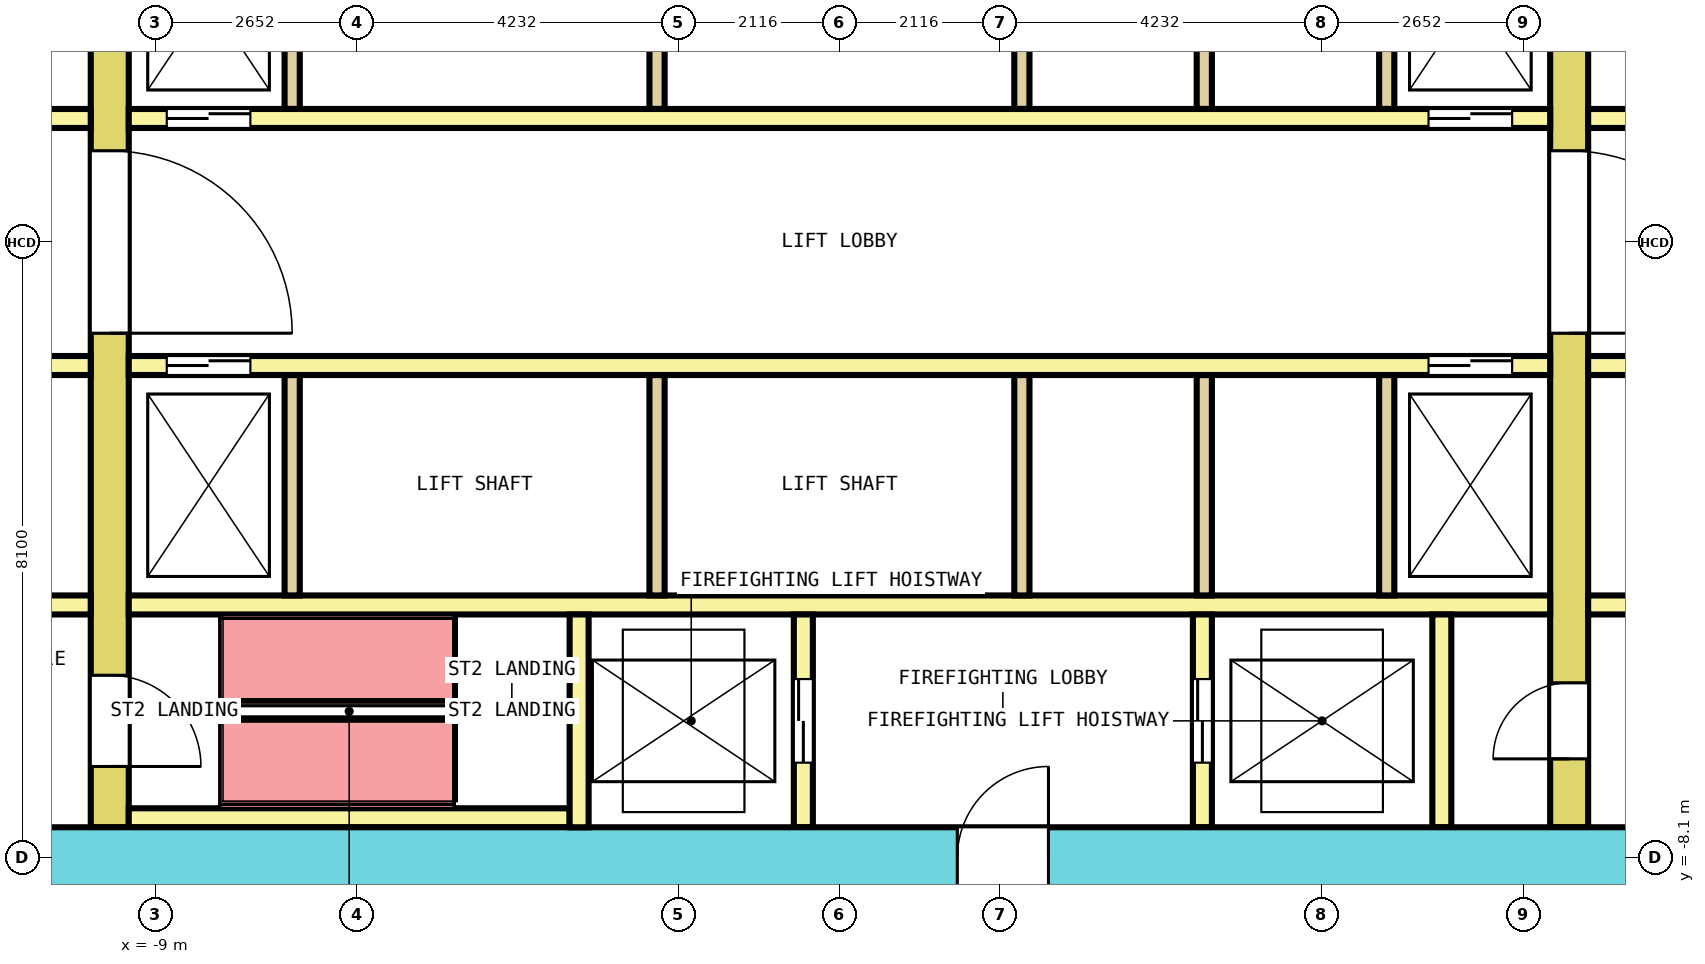
"""IFC4 building model, lengths in metres.
Left out: names, types, materials, properties, quantities, classifications, styles, units other than length and angle.
Written with IfcOpenShell. Run it as: python <this file> out.ifc"""

import sys

from ifc_helpers import new_model, si_unit, direction, frame, frame_2d, origin, place, context, subcontext, project, spatial, rectangle, extrude, element, fill, save


model = new_model("IFC4")
c1 = context("Model", 3, precision=1e-05, world=origin(), true_north=direction((0.0, 1.0)))
c2 = subcontext(c1, "Body", "Model", "MODEL_VIEW")
j1 = project(units=[si_unit("LENGTHUNIT", "METRE"), si_unit("PLANEANGLEUNIT", "RADIAN")], contexts=[c1])
p1 = place(None, origin())
s1 = spatial("IfcSite", under=j1, at=p1, CompositionType="ELEMENT")
p2 = place(p1, origin())
s2 = spatial("IfcBuilding", under=s1, at=p2, CompositionType="ELEMENT")
p3 = place(p2, frame((0.0, 0.0, 71.8)))
s3 = spatial("IfcBuildingStorey", under=s2, at=p3, CompositionType="ELEMENT", Elevation=71.8)
p4 = place(p3, frame((-12.8, -8.1, 0.0), z_axis=(0.0, 0.0, 1.0), x_axis=(1.0, 0.0, 0.0)))
e1 = element("IfcWall", 1, at=p4, inside=s3, PredefinedType="SHEAR", context=c2, shape_type="SweptSolid", body=[
    extrude(rectangle(XDim=25.6, YDim=0.8, at=frame_2d((12.8, 0.0))), origin(), (0.0, 0.0, 1.0), 8.7),
])
p5 = place(p4, frame((14.35, 0.0, 0.0)))
e2 = element("IfcOpeningElement", 2, at=p5, cuts=e1, PredefinedType="OPENING", context=c2, shape_type="SweptSolid", body=[
    extrude(rectangle(XDim=1.2, YDim=2.1, at=frame_2d((0.6, 1.05))), frame((0.0, 0.41, 0.0), z_axis=(0.0, -1.0, 0.0), x_axis=(1.0, 0.0, 0.0)), (0.0, 0.0, 1.0), 0.82),
])
p6 = place(p3, frame((-9.6, -7.7, 0.0), z_axis=(0.0, 0.0, 1.0), x_axis=(0.0, 1.0, 0.0)))
e3 = element("IfcWall", 3, at=p6, inside=s3, PredefinedType="SHEAR", context=c2, shape_type="SweptSolid", body=[
    extrude(rectangle(XDim=15.4, YDim=0.5, at=frame_2d((7.7, 0.0))), origin(), (0.0, 0.0, 1.0), 8.7),
])
p7 = place(p6, frame((6.5, 0.0, 0.0)))
e4 = element("IfcOpeningElement", 4, at=p7, cuts=e3, PredefinedType="OPENING", context=c2, shape_type="SweptSolid", body=[
    extrude(rectangle(XDim=2.4, YDim=2.1, at=frame_2d((1.2, 1.05))), frame((0.0, 0.26, 0.0), z_axis=(0.0, -1.0, 0.0), x_axis=(1.0, 0.0, 0.0)), (0.0, 0.0, 1.0), 0.52),
])
p8 = place(p6, frame((13.4, 0.0, 0.0)))
e5 = element("IfcOpeningElement", 5, at=p8, cuts=e3, PredefinedType="OPENING", context=c2, shape_type="SweptSolid", body=[
    extrude(rectangle(XDim=1.2, YDim=2.1, at=frame_2d((0.6, 1.05))), frame((0.0, 0.26, 0.0), z_axis=(0.0, -1.0, 0.0), x_axis=(1.0, 0.0, 0.0)), (0.0, 0.0, 1.0), 0.52),
])
p9 = place(p6, frame((0.8, 0.0, 0.0)))
e6 = element("IfcOpeningElement", 6, at=p9, cuts=e3, PredefinedType="OPENING", context=c2, shape_type="SweptSolid", body=[
    extrude(rectangle(XDim=1.2, YDim=2.1, at=frame_2d((0.6, 1.05))), frame((0.0, 0.26, 0.0), z_axis=(0.0, -1.0, 0.0), x_axis=(1.0, 0.0, 0.0)), (0.0, 0.0, 1.0), 0.52),
])
p10 = place(p3, frame((9.6, -7.7, 0.0), z_axis=(0.0, 0.0, 1.0), x_axis=(0.0, 1.0, 0.0)))
e7 = element("IfcWall", 7, at=p10, inside=s3, PredefinedType="SHEAR", context=c2, shape_type="SweptSolid", body=[
    extrude(rectangle(XDim=15.4, YDim=0.5, at=frame_2d((7.7, 0.0))), origin(), (0.0, 0.0, 1.0), 8.7),
])
p11 = place(p10, frame((6.5, 0.0, 0.0)))
e8 = element("IfcOpeningElement", 8, at=p11, cuts=e7, PredefinedType="OPENING", context=c2, shape_type="SweptSolid", body=[
    extrude(rectangle(XDim=2.4, YDim=2.1, at=frame_2d((1.2, 1.05))), frame((0.0, 0.26, 0.0), z_axis=(0.0, -1.0, 0.0), x_axis=(1.0, 0.0, 0.0)), (0.0, 0.0, 1.0), 0.52),
])
p12 = place(p10, frame((13.4, 0.0, 0.0)))
e9 = element("IfcOpeningElement", 9, at=p12, cuts=e7, PredefinedType="OPENING", context=c2, shape_type="SweptSolid", body=[
    extrude(rectangle(XDim=1.2, YDim=2.1, at=frame_2d((0.6, 1.05))), frame((0.0, 0.26, 0.0), z_axis=(0.0, -1.0, 0.0), x_axis=(1.0, 0.0, 0.0)), (0.0, 0.0, 1.0), 0.52),
])
p13 = place(p10, frame((0.9, 0.0, 0.0)))
e10 = element("IfcOpeningElement", 10, at=p13, cuts=e7, PredefinedType="OPENING", context=c2, shape_type="SweptSolid", body=[
    extrude(rectangle(XDim=1.0, YDim=2.1, at=frame_2d((0.5, 1.05))), frame((0.0, 0.26, 0.0), z_axis=(0.0, -1.0, 0.0), x_axis=(1.0, 0.0, 0.0)), (0.0, 0.0, 1.0), 0.52),
])
p14 = place(p3, frame((-12.8, 1.625, 0.0), z_axis=(0.0, 0.0, 1.0), x_axis=(1.0, 0.0, 0.0)))
e11 = element("IfcWall", 11, at=p14, inside=s3, PredefinedType="SOLIDWALL", context=c2, shape_type="SweptSolid", body=[
    extrude(rectangle(XDim=2.95, YDim=0.25, at=frame_2d((1.475, 0.0))), origin(), (0.0, 0.0, 1.0), 8.7),
])
p15 = place(p14, frame((0.925, 0.0, 0.0)))
e12 = element("IfcOpeningElement", 12, at=p15, cuts=e11, PredefinedType="OPENING", context=c2, shape_type="SweptSolid", body=[
    extrude(rectangle(XDim=1.1, YDim=2.1, at=frame_2d((0.55, 1.05))), frame((0.0, 0.135, 0.0), z_axis=(0.0, -1.0, 0.0), x_axis=(1.0, 0.0, 0.0)), (0.0, 0.0, 1.0), 0.27),
])
p16 = place(p3, frame((-9.35, 1.625, 0.0), z_axis=(0.0, 0.0, 1.0), x_axis=(1.0, 0.0, 0.0)))
e13 = element("IfcWall", 13, at=p16, inside=s3, PredefinedType="SOLIDWALL", context=c2, shape_type="SweptSolid", body=[
    extrude(rectangle(XDim=18.7, YDim=0.25, at=frame_2d((9.35, 0.0))), origin(), (0.0, 0.0, 1.0), 8.7),
])
p17 = place(p16, frame((0.5, 0.0, 0.0)))
e14 = element("IfcOpeningElement", 14, at=p17, cuts=e13, PredefinedType="OPENING", context=c2, shape_type="SweptSolid", body=[
    extrude(rectangle(XDim=1.1, YDim=2.1, at=frame_2d((0.55, 1.05))), frame((0.0, 0.135, 0.0), z_axis=(0.0, -1.0, 0.0), x_axis=(1.0, 0.0, 0.0)), (0.0, 0.0, 1.0), 0.27),
])
p18 = place(p16, frame((17.1, 0.0, 0.0)))
e15 = element("IfcOpeningElement", 15, at=p18, cuts=e13, PredefinedType="OPENING", context=c2, shape_type="SweptSolid", body=[
    extrude(rectangle(XDim=1.1, YDim=2.1, at=frame_2d((0.55, 1.05))), frame((0.0, 0.135, 0.0), z_axis=(0.0, -1.0, 0.0), x_axis=(1.0, 0.0, 0.0)), (0.0, 0.0, 1.0), 0.27),
])
p19 = place(p3, frame((9.85, 1.625, 0.0), z_axis=(0.0, 0.0, 1.0), x_axis=(1.0, 0.0, 0.0)))
e16 = element("IfcWall", 16, at=p19, inside=s3, PredefinedType="SOLIDWALL", context=c2, shape_type="SweptSolid", body=[
    extrude(rectangle(XDim=2.95, YDim=0.25, at=frame_2d((1.475, 0.0))), origin(), (0.0, 0.0, 1.0), 8.7),
])
p20 = place(p19, frame((0.925, 0.0, 0.0)))
e17 = element("IfcOpeningElement", 17, at=p20, cuts=e16, PredefinedType="OPENING", context=c2, shape_type="SweptSolid", body=[
    extrude(rectangle(XDim=1.1, YDim=2.1, at=frame_2d((0.55, 1.05))), frame((0.0, 0.135, 0.0), z_axis=(0.0, -1.0, 0.0), x_axis=(1.0, 0.0, 0.0)), (0.0, 0.0, 1.0), 0.27),
])
for number, where, z_axis, x_axis in (
    (18, (-7.2, 1.75, 0.0), (0.0, 0.0, 1.0), (0.0, 1.0, 0.0)),
    (19, (-2.4, 1.75, 0.0), (0.0, 0.0, 1.0), (0.0, 1.0, 0.0)),
    (20, (2.4, 1.75, 0.0), (0.0, 0.0, 1.0), (0.0, 1.0, 0.0)),
    (21, (4.8, 1.75, 0.0), (0.0, 0.0, 1.0), (0.0, 1.0, 0.0)),
    (22, (7.2, 1.75, 0.0), (0.0, 0.0, 1.0), (0.0, 1.0, 0.0)),
):
    element("IfcWall", number, at=place(p3, frame(where, z_axis=z_axis, x_axis=x_axis)), inside=s3, PredefinedType="SOLIDWALL", context=c2, shape_type="SweptSolid", body=[
        extrude(rectangle(XDim=2.9, YDim=0.2, at=frame_2d((1.45, 0.0))), origin(), (0.0, 0.0, 1.0), 8.7),
    ])
p21 = place(p3, frame((-12.8, -1.625, 0.0), z_axis=(0.0, 0.0, 1.0), x_axis=(1.0, 0.0, 0.0)))
e23 = element("IfcWall", 23, at=p21, inside=s3, PredefinedType="SOLIDWALL", context=c2, shape_type="SweptSolid", body=[
    extrude(rectangle(XDim=2.95, YDim=0.25, at=frame_2d((1.475, 0.0))), origin(), (0.0, 0.0, 1.0), 8.7),
])
p22 = place(p21, frame((0.925, 0.0, 0.0)))
e24 = element("IfcOpeningElement", 24, at=p22, cuts=e23, PredefinedType="OPENING", context=c2, shape_type="SweptSolid", body=[
    extrude(rectangle(XDim=1.1, YDim=2.1, at=frame_2d((0.55, 1.05))), frame((0.0, 0.135, 0.0), z_axis=(0.0, -1.0, 0.0), x_axis=(1.0, 0.0, 0.0)), (0.0, 0.0, 1.0), 0.27),
])
p23 = place(p3, frame((-9.35, -1.625, 0.0), z_axis=(0.0, 0.0, 1.0), x_axis=(1.0, 0.0, 0.0)))
e25 = element("IfcWall", 25, at=p23, inside=s3, PredefinedType="SOLIDWALL", context=c2, shape_type="SweptSolid", body=[
    extrude(rectangle(XDim=18.7, YDim=0.25, at=frame_2d((9.35, 0.0))), origin(), (0.0, 0.0, 1.0), 8.7),
])
p24 = place(p23, frame((0.5, 0.0, 0.0)))
e26 = element("IfcOpeningElement", 26, at=p24, cuts=e25, PredefinedType="OPENING", context=c2, shape_type="SweptSolid", body=[
    extrude(rectangle(XDim=1.1, YDim=2.1, at=frame_2d((0.55, 1.05))), frame((0.0, 0.135, 0.0), z_axis=(0.0, -1.0, 0.0), x_axis=(1.0, 0.0, 0.0)), (0.0, 0.0, 1.0), 0.27),
])
p25 = place(p23, frame((17.1, 0.0, 0.0)))
e27 = element("IfcOpeningElement", 27, at=p25, cuts=e25, PredefinedType="OPENING", context=c2, shape_type="SweptSolid", body=[
    extrude(rectangle(XDim=1.1, YDim=2.1, at=frame_2d((0.55, 1.05))), frame((0.0, 0.135, 0.0), z_axis=(0.0, -1.0, 0.0), x_axis=(1.0, 0.0, 0.0)), (0.0, 0.0, 1.0), 0.27),
])
p26 = place(p3, frame((9.85, -1.625, 0.0), z_axis=(0.0, 0.0, 1.0), x_axis=(1.0, 0.0, 0.0)))
e28 = element("IfcWall", 28, at=p26, inside=s3, PredefinedType="SOLIDWALL", context=c2, shape_type="SweptSolid", body=[
    extrude(rectangle(XDim=2.95, YDim=0.25, at=frame_2d((1.475, 0.0))), origin(), (0.0, 0.0, 1.0), 8.7),
])
p27 = place(p26, frame((0.925, 0.0, 0.0)))
e29 = element("IfcOpeningElement", 29, at=p27, cuts=e28, PredefinedType="OPENING", context=c2, shape_type="SweptSolid", body=[
    extrude(rectangle(XDim=1.1, YDim=2.1, at=frame_2d((0.55, 1.05))), frame((0.0, 0.135, 0.0), z_axis=(0.0, -1.0, 0.0), x_axis=(1.0, 0.0, 0.0)), (0.0, 0.0, 1.0), 0.27),
])
p28 = place(p3, frame((-12.8, -4.775, 0.0), z_axis=(0.0, 0.0, 1.0), x_axis=(1.0, 0.0, 0.0)))
e30 = element("IfcWall", 30, at=p28, inside=s3, PredefinedType="SOLIDWALL", context=c2, shape_type="SweptSolid", body=[
    extrude(rectangle(XDim=2.95, YDim=0.25, at=frame_2d((1.475, 0.0))), origin(), (0.0, 0.0, 1.0), 8.7),
])
p29 = place(p3, frame((-9.35, -4.775, 0.0), z_axis=(0.0, 0.0, 1.0), x_axis=(1.0, 0.0, 0.0)))
e31 = element("IfcWall", 31, at=p29, inside=s3, PredefinedType="SOLIDWALL", context=c2, shape_type="SweptSolid", body=[
    extrude(rectangle(XDim=18.7, YDim=0.25, at=frame_2d((9.35, 0.0))), origin(), (0.0, 0.0, 1.0), 8.7),
])
p30 = place(p3, frame((9.85, -4.775, 0.0), z_axis=(0.0, 0.0, 1.0), x_axis=(1.0, 0.0, 0.0)))
e32 = element("IfcWall", 32, at=p30, inside=s3, PredefinedType="SOLIDWALL", context=c2, shape_type="SweptSolid", body=[
    extrude(rectangle(XDim=2.95, YDim=0.25, at=frame_2d((1.475, 0.0))), origin(), (0.0, 0.0, 1.0), 8.7),
])
for number, where, z_axis, x_axis in (
    (33, (-7.2, -4.65, 0.0), (0.0, 0.0, 1.0), (0.0, 1.0, 0.0)),
    (34, (-2.4, -4.65, 0.0), (0.0, 0.0, 1.0), (0.0, 1.0, 0.0)),
    (35, (2.4, -4.65, 0.0), (0.0, 0.0, 1.0), (0.0, 1.0, 0.0)),
    (36, (4.8, -4.65, 0.0), (0.0, 0.0, 1.0), (0.0, 1.0, 0.0)),
    (37, (7.2, -4.65, 0.0), (0.0, 0.0, 1.0), (0.0, 1.0, 0.0)),
):
    element("IfcWall", number, at=place(p3, frame(where, z_axis=z_axis, x_axis=x_axis)), inside=s3, PredefinedType="SOLIDWALL", context=c2, shape_type="SweptSolid", body=[
        extrude(rectangle(XDim=2.9, YDim=0.2, at=frame_2d((1.45, 0.0))), origin(), (0.0, 0.0, 1.0), 8.7),
    ])
p31 = place(p3, frame((-9.35, -7.575, 0.0), z_axis=(0.0, 0.0, 1.0), x_axis=(1.0, 0.0, 0.0)))
e38 = element("IfcWall", 38, at=p31, inside=s3, PredefinedType="SOLIDWALL", context=c2, shape_type="SweptSolid", body=[
    extrude(rectangle(XDim=5.8, YDim=0.25, at=frame_2d((2.9, 0.0))), origin(), (0.0, 0.0, 1.0), 8.7),
])
p32 = place(p3, frame((-3.425, -7.7, 0.0), z_axis=(0.0, 0.0, 1.0), x_axis=(0.0, 1.0, 0.0)))
e39 = element("IfcWall", 39, at=p32, inside=s3, PredefinedType="SOLIDWALL", context=c2, shape_type="SweptSolid", body=[
    extrude(rectangle(XDim=2.8, YDim=0.25, at=frame_2d((1.4, 0.0))), origin(), (0.0, 0.0, 1.0), 8.7),
])
p33 = place(p3, frame((-0.475, -7.7, 0.0), z_axis=(0.0, 0.0, 1.0), x_axis=(0.0, 1.0, 0.0)))
e40 = element("IfcWall", 40, at=p33, inside=s3, PredefinedType="SOLIDWALL", context=c2, shape_type="SweptSolid", body=[
    extrude(rectangle(XDim=2.8, YDim=0.25, at=frame_2d((1.4, 0.0))), origin(), (0.0, 0.0, 1.0), 8.7),
])
p34 = place(p33, frame((0.85, 0.0, 0.0)))
e41 = element("IfcOpeningElement", 41, at=p34, cuts=e40, PredefinedType="OPENING", context=c2, shape_type="SweptSolid", body=[
    extrude(rectangle(XDim=1.1, YDim=2.1, at=frame_2d((0.55, 1.05))), frame((0.0, 0.135, 0.0), z_axis=(0.0, -1.0, 0.0), x_axis=(1.0, 0.0, 0.0)), (0.0, 0.0, 1.0), 0.27),
])
p35 = place(p3, frame((4.775, -7.7, 0.0), z_axis=(0.0, 0.0, 1.0), x_axis=(0.0, 1.0, 0.0)))
e42 = element("IfcWall", 42, at=p35, inside=s3, PredefinedType="SOLIDWALL", context=c2, shape_type="SweptSolid", body=[
    extrude(rectangle(XDim=2.8, YDim=0.25, at=frame_2d((1.4, 0.0))), origin(), (0.0, 0.0, 1.0), 8.7),
])
p36 = place(p35, frame((0.85, 0.0, 0.0)))
e43 = element("IfcOpeningElement", 43, at=p36, cuts=e42, PredefinedType="OPENING", context=c2, shape_type="SweptSolid", body=[
    extrude(rectangle(XDim=1.1, YDim=2.1, at=frame_2d((0.55, 1.05))), frame((0.0, 0.135, 0.0), z_axis=(0.0, -1.0, 0.0), x_axis=(1.0, 0.0, 0.0)), (0.0, 0.0, 1.0), 0.27),
])
p37 = place(p3, frame((7.925, -7.7, 0.0), z_axis=(0.0, 0.0, 1.0), x_axis=(0.0, 1.0, 0.0)))
e44 = element("IfcWall", 44, at=p37, inside=s3, PredefinedType="SOLIDWALL", context=c2, shape_type="SweptSolid", body=[
    extrude(rectangle(XDim=2.8, YDim=0.25, at=frame_2d((1.4, 0.0))), origin(), (0.0, 0.0, 1.0), 8.7),
])
p38 = place(p17, origin())
e45 = element("IfcDoor", 45, at=p38, inside=s3, OperationType="DOUBLE_DOOR_SLIDING", PredefinedType="DOOR", context=c2, shape_type="SweptSolid", body=[
    extrude(rectangle(XDim=1.1, YDim=2.1, at=frame_2d((0.55, 1.05))), frame((0.0, 0.075, 0.0), z_axis=(0.0, -1.0, 0.0), x_axis=(1.0, 0.0, 0.0)), (0.0, 0.0, 1.0), 0.15),
])
fill(e14, e45)
p39 = place(p18, origin())
e46 = element("IfcDoor", 46, at=p39, inside=s3, OperationType="DOUBLE_DOOR_SLIDING", PredefinedType="DOOR", context=c2, shape_type="SweptSolid", body=[
    extrude(rectangle(XDim=1.1, YDim=2.1, at=frame_2d((0.55, 1.05))), frame((0.0, 0.075, 0.0), z_axis=(0.0, -1.0, 0.0), x_axis=(1.0, 0.0, 0.0)), (0.0, 0.0, 1.0), 0.15),
])
fill(e15, e46)
p40 = place(p24, origin())
e47 = element("IfcDoor", 47, at=p40, inside=s3, OperationType="DOUBLE_DOOR_SLIDING", PredefinedType="DOOR", context=c2, shape_type="SweptSolid", body=[
    extrude(rectangle(XDim=1.1, YDim=2.1, at=frame_2d((0.55, 1.05))), frame((0.0, 0.075, 0.0), z_axis=(0.0, -1.0, 0.0), x_axis=(1.0, 0.0, 0.0)), (0.0, 0.0, 1.0), 0.15),
])
fill(e26, e47)
p41 = place(p25, origin())
e48 = element("IfcDoor", 48, at=p41, inside=s3, OperationType="DOUBLE_DOOR_SLIDING", PredefinedType="DOOR", context=c2, shape_type="SweptSolid", body=[
    extrude(rectangle(XDim=1.1, YDim=2.1, at=frame_2d((0.55, 1.05))), frame((0.0, 0.075, 0.0), z_axis=(0.0, -1.0, 0.0), x_axis=(1.0, 0.0, 0.0)), (0.0, 0.0, 1.0), 0.15),
])
fill(e27, e48)
p42 = place(p34, origin())
e49 = element("IfcDoor", 49, at=p42, inside=s3, OperationType="DOUBLE_DOOR_SLIDING", PredefinedType="DOOR", context=c2, shape_type="SweptSolid", body=[
    extrude(rectangle(XDim=1.1, YDim=2.1, at=frame_2d((0.55, 1.05))), frame((0.0, 0.075, 0.0), z_axis=(0.0, -1.0, 0.0), x_axis=(1.0, 0.0, 0.0)), (0.0, 0.0, 1.0), 0.15),
])
fill(e41, e49)
p43 = place(p36, origin())
e50 = element("IfcDoor", 50, at=p43, inside=s3, OperationType="DOUBLE_DOOR_SLIDING", PredefinedType="DOOR", context=c2, shape_type="SweptSolid", body=[
    extrude(rectangle(XDim=1.1, YDim=2.1, at=frame_2d((0.55, 1.05))), frame((0.0, 0.075, 0.0), z_axis=(0.0, -1.0, 0.0), x_axis=(1.0, 0.0, 0.0)), (0.0, 0.0, 1.0), 0.15),
])
fill(e43, e50)
p44 = place(p7, origin())
e51 = element("IfcDoor", 51, at=p44, inside=s3, OperationType="DOUBLE_DOOR_SINGLE_SWING", PredefinedType="DOOR", context=c2, shape_type="SweptSolid", body=[
    extrude(rectangle(XDim=2.4, YDim=2.1, at=frame_2d((1.2, 1.05))), frame((0.0, 0.2, 0.0), z_axis=(0.0, -1.0, 0.0), x_axis=(1.0, 0.0, 0.0)), (0.0, 0.0, 1.0), 0.4),
])
fill(e4, e51)
p45 = place(p11, origin())
e52 = element("IfcDoor", 52, at=p45, inside=s3, OperationType="DOUBLE_DOOR_SINGLE_SWING", PredefinedType="DOOR", context=c2, shape_type="SweptSolid", body=[
    extrude(rectangle(XDim=2.4, YDim=2.1, at=frame_2d((1.2, 1.05))), frame((0.0, 0.2, 0.0), z_axis=(0.0, -1.0, 0.0), x_axis=(1.0, 0.0, 0.0)), (0.0, 0.0, 1.0), 0.4),
])
fill(e8, e52)
p46 = place(p9, origin())
e53 = element("IfcDoor", 53, at=p46, inside=s3, OperationType="SINGLE_SWING_RIGHT", PredefinedType="DOOR", context=c2, shape_type="SweptSolid", body=[
    extrude(rectangle(XDim=1.2, YDim=2.1, at=frame_2d((0.6, 1.05))), frame((0.0, 0.2, 0.0), z_axis=(0.0, -1.0, 0.0), x_axis=(1.0, 0.0, 0.0)), (0.0, 0.0, 1.0), 0.4),
])
fill(e6, e53)
p47 = place(p5, origin())
e54 = element("IfcDoor", 54, at=p47, inside=s3, OperationType="SINGLE_SWING_RIGHT", PredefinedType="DOOR", context=c2, shape_type="SweptSolid", body=[
    extrude(rectangle(XDim=1.2, YDim=2.1, at=frame_2d((0.6, 1.05))), frame((0.0, 0.3, 0.0), z_axis=(0.0, -1.0, 0.0), x_axis=(1.0, 0.0, 0.0)), (0.0, 0.0, 1.0), 0.6),
])
fill(e2, e54)
p48 = place(p13, origin())
e55 = element("IfcDoor", 55, at=p48, inside=s3, OperationType="SINGLE_SWING_RIGHT", PredefinedType="DOOR", context=c2, shape_type="SweptSolid", body=[
    extrude(rectangle(XDim=1.0, YDim=2.1, at=frame_2d((0.5, 1.05))), frame((0.0, 0.2, 0.0), z_axis=(0.0, -1.0, 0.0), x_axis=(1.0, 0.0, 0.0)), (0.0, 0.0, 1.0), 0.4),
])
fill(e10, e55)
save(model, sys.argv[1])
